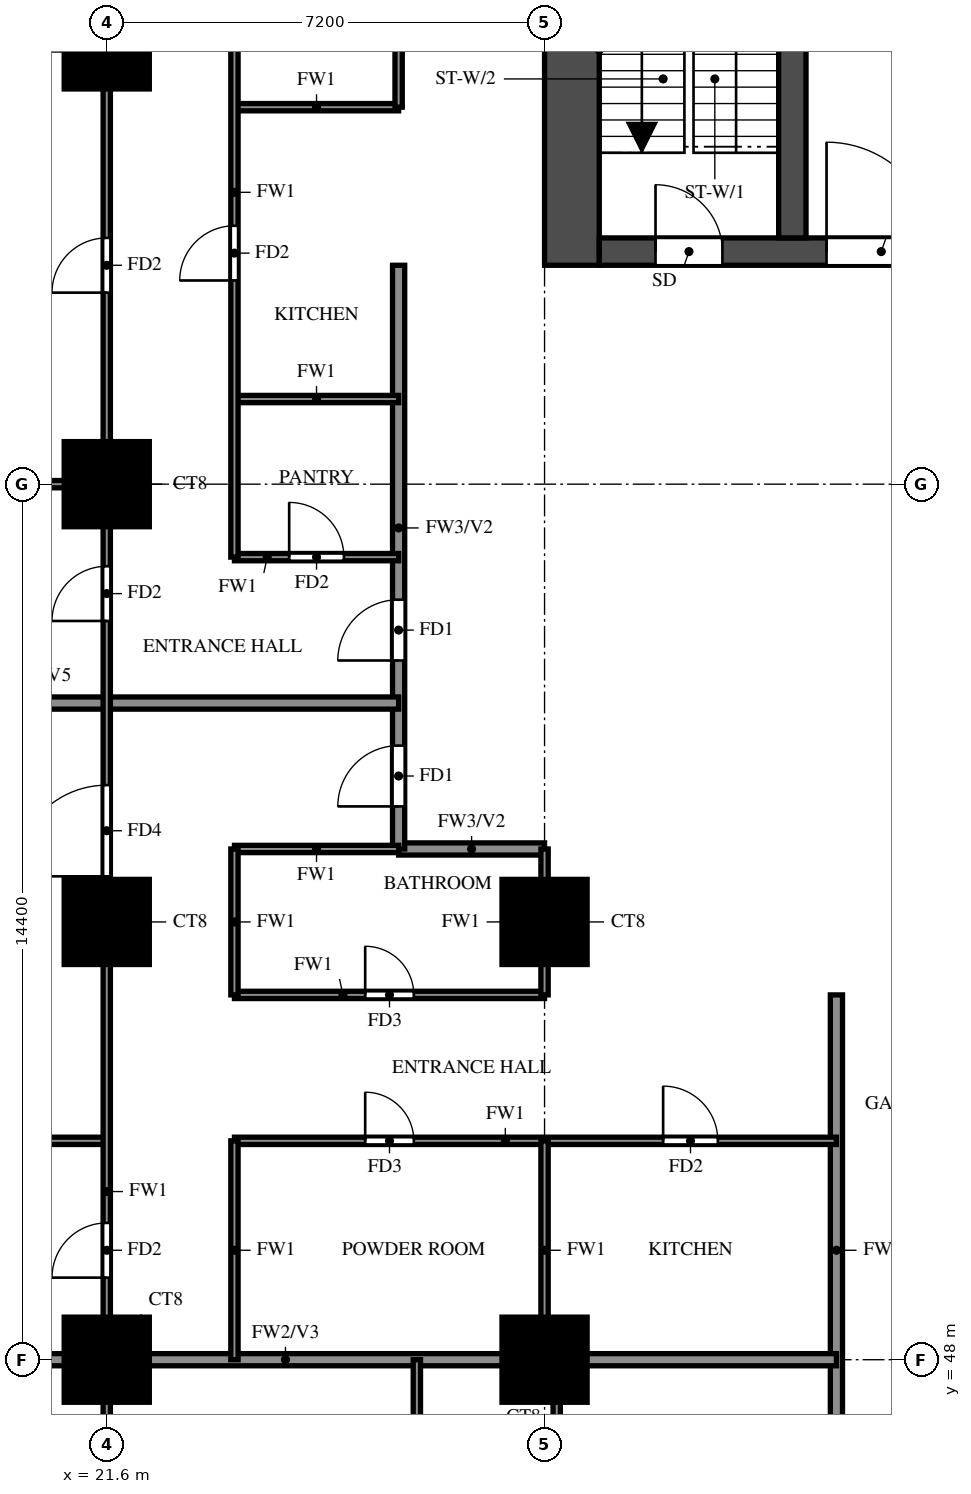
"""IFC4 building model, lengths in metres.
Left out: names, types, materials, properties, quantities, classifications, styles, units other than length and angle.
Written with IfcOpenShell. Run it as: python <this file> out.ifc"""

import sys

from ifc_helpers import new_model, si_unit, direction, frame, frame_2d, origin, origin_2d, place, context, subcontext, project, spatial, rectangle, extrude, source, transform, mapped, element, fill, save


model = new_model("IFC4")
c1 = context("Model", 3, precision=1e-05, world=origin(), true_north=direction((0.0, 1.0)))
c2 = subcontext(c1, "Body", "Model", "MODEL_VIEW")
j1 = project(units=[si_unit("LENGTHUNIT", "METRE"), si_unit("PLANEANGLEUNIT", "RADIAN")], contexts=[c1])
p1 = place(None, origin())
s1 = spatial("IfcSite", under=j1, at=p1, CompositionType="ELEMENT")
p2 = place(p1, origin())
s2 = spatial("IfcBuilding", under=s1, at=p2, CompositionType="ELEMENT")
p3 = place(p2, frame((0.0, 0.0, 44.5)))
s3 = spatial("IfcBuildingStorey", under=s2, at=p3, CompositionType="ELEMENT", Elevation=44.5)
m1 = source(origin(), c2, "Body", "SweptSolid", [
    extrude(rectangle(XDim=1.4, YDim=1.4, at=origin_2d()), origin(), (0.0, 0.0, 1.0), 3.18),
])
for number, where, z_axis, x_axis in (
    (1, (21.6, 48.0, 0.0), (0.0, 0.0, 1.0), (1.0, 0.0, 0.0)),
    (2, (28.8, 48.0, 0.0), (0.0, 0.0, 1.0), (1.0, 0.0, 0.0)),
    (3, (21.6, 55.2, 0.0), (0.0, 0.0, 1.0), (1.0, 0.0, 0.0)),
    (4, (28.8, 55.2, 0.0), (0.0, 0.0, 1.0), (1.0, 0.0, 0.0)),
    (5, (21.6, 62.4, 0.0), (0.0, 0.0, 1.0), (1.0, 0.0, 0.0)),
    (6, (21.6, 69.6, 0.0), (0.0, 0.0, 1.0), (1.0, 0.0, 0.0)),
):
    element("IfcColumn", number, at=place(p3, frame(where, z_axis=z_axis, x_axis=x_axis)), inside=s3, PredefinedType="COLUMN", context=c2, shape_type="MappedRepresentation", body=[
        mapped(m1, transform((0.0, 0.0, 0.0))),
    ])
p4 = place(p3, frame((29.25, 66.0, 0.0), z_axis=(0.0, 0.0, 1.0), x_axis=(0.0, 1.0, 0.0)))
e7 = element("IfcWall", 7, at=p4, inside=s3, PredefinedType="SHEAR", context=c2, shape_type="SweptSolid", body=[
    extrude(rectangle(XDim=12.0, YDim=0.9, at=frame_2d((6.0, 0.0))), origin(), (0.0, 0.0, 1.0), 3.18),
])
p5 = place(p3, frame((29.7, 66.225, 0.0), z_axis=(0.0, 0.0, 1.0), x_axis=(1.0, 0.0, 0.0)))
e8 = element("IfcWall", 8, at=p5, inside=s3, PredefinedType="SHEAR", context=c2, shape_type="SweptSolid", body=[
    extrude(rectangle(XDim=41.4, YDim=0.45, at=frame_2d((20.7, 0.0))), origin(), (0.0, 0.0, 1.0), 3.18),
])
p6 = place(p5, frame((0.925, 0.0, 0.0)))
e9 = element("IfcOpeningElement", 9, at=p6, cuts=e8, PredefinedType="OPENING", context=c2, shape_type="SweptSolid", body=[
    extrude(rectangle(XDim=1.1, YDim=2.1, at=frame_2d((0.55, 1.05))), frame((0.0, 0.235, 0.0), z_axis=(0.0, -1.0, 0.0), x_axis=(1.0, 0.0, 0.0)), (0.0, 0.0, 1.0), 0.47),
])
p7 = place(p5, frame((3.738, 0.0, 0.0)))
e10 = element("IfcOpeningElement", 10, at=p7, cuts=e8, PredefinedType="OPENING", context=c2, shape_type="SweptSolid", body=[
    extrude(rectangle(XDim=1.8, YDim=2.1, at=frame_2d((0.9, 1.05))), frame((0.0, 0.235, 0.0), z_axis=(0.0, -1.0, 0.0), x_axis=(1.0, 0.0, 0.0)), (0.0, 0.0, 1.0), 0.47),
])
p8 = place(p3, frame((32.875, 66.45, 0.0), z_axis=(0.0, 0.0, 1.0), x_axis=(0.0, 1.0, 0.0)))
e11 = element("IfcWall", 11, at=p8, inside=s3, PredefinedType="SHEAR", context=c2, shape_type="SweptSolid", body=[
    extrude(rectangle(XDim=10.65, YDim=0.45, at=frame_2d((5.325, 0.0))), origin(), (0.0, 0.0, 1.0), 3.18),
])
p9 = place(p3, frame((26.4, 56.4, 0.0), z_axis=(0.0, 0.0, 1.0), x_axis=(1.0, 0.0, 0.0)))
e12 = element("IfcWall", 12, at=p9, inside=s3, PredefinedType="SOLIDWALL", context=c2, shape_type="SweptSolid", body=[
    extrude(rectangle(XDim=2.4, YDim=0.2, at=frame_2d((1.2, 0.0))), origin(), (0.0, 0.0, 1.0), 3.18),
])
p10 = place(p3, frame((26.4, 56.4, 0.0), z_axis=(0.0, 0.0, 1.0), x_axis=(0.0, 1.0, 0.0)))
e13 = element("IfcWall", 13, at=p10, inside=s3, PredefinedType="SOLIDWALL", context=c2, shape_type="SweptSolid", body=[
    extrude(rectangle(XDim=9.6, YDim=0.2, at=frame_2d((4.8, 0.0))), origin(), (0.0, 0.0, 1.0), 3.18),
])
p11 = place(p10, frame((0.7, 0.0, 0.0)))
e14 = element("IfcOpeningElement", 14, at=p11, cuts=e13, PredefinedType="OPENING", context=c2, shape_type="SweptSolid", body=[
    extrude(rectangle(XDim=1.0, YDim=2.1, at=frame_2d((0.5, 1.05))), frame((0.0, 0.11, 0.0), z_axis=(0.0, -1.0, 0.0), x_axis=(1.0, 0.0, 0.0)), (0.0, 0.0, 1.0), 0.22),
])
p12 = place(p10, frame((3.1, 0.0, 0.0)))
e15 = element("IfcOpeningElement", 15, at=p12, cuts=e13, PredefinedType="OPENING", context=c2, shape_type="SweptSolid", body=[
    extrude(rectangle(XDim=1.0, YDim=2.1, at=frame_2d((0.5, 1.05))), frame((0.0, 0.11, 0.0), z_axis=(0.0, -1.0, 0.0), x_axis=(1.0, 0.0, 0.0)), (0.0, 0.0, 1.0), 0.22),
])
p13 = place(p3, frame((33.6, 45.6, 0.0), z_axis=(0.0, 0.0, 1.0), x_axis=(0.0, 1.0, 0.0)))
e16 = element("IfcWall", 16, at=p13, inside=s3, PredefinedType="SOLIDWALL", context=c2, shape_type="SweptSolid", body=[
    extrude(rectangle(XDim=8.4, YDim=0.2, at=frame_2d((4.2, 0.0))), origin(), (0.0, 0.0, 1.0), 3.18),
])
p14 = place(p3, frame((14.525, 48.0, 0.0), z_axis=(0.0, 0.0, 1.0), x_axis=(1.0, 0.0, 0.0)))
e17 = element("IfcWall", 17, at=p14, inside=s3, PredefinedType="SOLIDWALL", context=c2, shape_type="SweptSolid", body=[
    extrude(rectangle(XDim=19.075, YDim=0.2, at=frame_2d((9.538, 0.0))), origin(), (0.0, 0.0, 1.0), 3.18),
])
p15 = place(p3, frame((14.525, 58.8, 0.0), z_axis=(0.0, 0.0, 1.0), x_axis=(1.0, 0.0, 0.0)))
e18 = element("IfcWall", 18, at=p15, inside=s3, PredefinedType="SOLIDWALL", context=c2, shape_type="SweptSolid", body=[
    extrude(rectangle(XDim=11.875, YDim=0.2, at=frame_2d((5.938, 0.0))), origin(), (0.0, 0.0, 1.0), 2.28),
])
p16 = place(p3, frame((14.525, 51.6, 0.0), z_axis=(0.0, 0.0, 1.0), x_axis=(1.0, 0.0, 0.0)))
e19 = element("IfcWall", 19, at=p16, inside=s3, PredefinedType="PARTITIONING", context=c2, shape_type="SweptSolid", body=[
    extrude(rectangle(XDim=7.075, YDim=0.12, at=frame_2d((3.538, 0.0))), origin(), (0.0, 0.0, 1.0), 2.28),
])
p17 = place(p3, frame((23.7, 51.6, 0.0), z_axis=(0.0, 0.0, 1.0), x_axis=(1.0, 0.0, 0.0)))
e20 = element("IfcWall", 20, at=p17, inside=s3, PredefinedType="PARTITIONING", context=c2, shape_type="SweptSolid", body=[
    extrude(rectangle(XDim=9.9, YDim=0.12, at=frame_2d((4.95, 0.0))), origin(), (0.0, 0.0, 1.0), 3.18),
])
p18 = place(p17, frame((2.15, 0.0, 0.0)))
e21 = element("IfcOpeningElement", 21, at=p18, cuts=e20, PredefinedType="OPENING", context=c2, shape_type="SweptSolid", body=[
    extrude(rectangle(XDim=0.8, YDim=2.1, at=frame_2d((0.4, 1.05))), frame((0.0, 0.07, 0.0), z_axis=(0.0, -1.0, 0.0), x_axis=(1.0, 0.0, 0.0)), (0.0, 0.0, 1.0), 0.14),
])
p19 = place(p17, frame((7.05, 0.0, 0.0)))
e22 = element("IfcOpeningElement", 22, at=p19, cuts=e20, PredefinedType="OPENING", context=c2, shape_type="SweptSolid", body=[
    extrude(rectangle(XDim=0.9, YDim=2.1, at=frame_2d((0.45, 1.05))), frame((0.0, 0.07, 0.0), z_axis=(0.0, -1.0, 0.0), x_axis=(1.0, 0.0, 0.0)), (0.0, 0.0, 1.0), 0.14),
])
p20 = place(p3, frame((23.7, 54.0, 0.0), z_axis=(0.0, 0.0, 1.0), x_axis=(1.0, 0.0, 0.0)))
e23 = element("IfcWall", 23, at=p20, inside=s3, PredefinedType="PARTITIONING", context=c2, shape_type="SweptSolid", body=[
    extrude(rectangle(XDim=5.1, YDim=0.12, at=frame_2d((2.55, 0.0))), origin(), (0.0, 0.0, 1.0), 3.18),
])
p21 = place(p20, frame((2.15, 0.0, 0.0)))
e24 = element("IfcOpeningElement", 24, at=p21, cuts=e23, PredefinedType="OPENING", context=c2, shape_type="SweptSolid", body=[
    extrude(rectangle(XDim=0.8, YDim=2.1, at=frame_2d((0.4, 1.05))), frame((0.0, 0.07, 0.0), z_axis=(0.0, -1.0, 0.0), x_axis=(1.0, 0.0, 0.0)), (0.0, 0.0, 1.0), 0.14),
])
p22 = place(p3, frame((23.7, 56.4, 0.0), z_axis=(0.0, 0.0, 1.0), x_axis=(1.0, 0.0, 0.0)))
e25 = element("IfcWall", 25, at=p22, inside=s3, PredefinedType="PARTITIONING", context=c2, shape_type="SweptSolid", body=[
    extrude(rectangle(XDim=2.7, YDim=0.12, at=frame_2d((1.35, 0.0))), origin(), (0.0, 0.0, 1.0), 3.18),
])
p23 = place(p3, frame((23.7, 61.2, 0.0), z_axis=(0.0, 0.0, 1.0), x_axis=(1.0, 0.0, 0.0)))
e26 = element("IfcWall", 26, at=p23, inside=s3, PredefinedType="PARTITIONING", context=c2, shape_type="SweptSolid", body=[
    extrude(rectangle(XDim=2.7, YDim=0.12, at=frame_2d((1.35, 0.0))), origin(), (0.0, 0.0, 1.0), 3.18),
])
p24 = place(p23, frame((0.9, 0.0, 0.0)))
e27 = element("IfcOpeningElement", 27, at=p24, cuts=e26, PredefinedType="OPENING", context=c2, shape_type="SweptSolid", body=[
    extrude(rectangle(XDim=0.9, YDim=2.1, at=frame_2d((0.45, 1.05))), frame((0.0, 0.07, 0.0), z_axis=(0.0, -1.0, 0.0), x_axis=(1.0, 0.0, 0.0)), (0.0, 0.0, 1.0), 0.14),
])
p25 = place(p3, frame((14.525, 62.4, 0.0), z_axis=(0.0, 0.0, 1.0), x_axis=(1.0, 0.0, 0.0)))
e28 = element("IfcWall", 28, at=p25, inside=s3, PredefinedType="PARTITIONING", context=c2, shape_type="SweptSolid", body=[
    extrude(rectangle(XDim=7.075, YDim=0.12, at=frame_2d((3.538, 0.0))), origin(), (0.0, 0.0, 1.0), 3.18),
])
for number, where, z_axis, x_axis in (
    (29, (23.7, 63.8, 0.0), (0.0, 0.0, 1.0), (1.0, 0.0, 0.0)),
    (30, (23.7, 68.6, 0.0), (0.0, 0.0, 1.0), (1.0, 0.0, 0.0)),
):
    element("IfcWall", number, at=place(p3, frame(where, z_axis=z_axis, x_axis=x_axis)), inside=s3, PredefinedType="PARTITIONING", context=c2, shape_type="SweptSolid", body=[
        extrude(rectangle(XDim=2.7, YDim=0.12, at=frame_2d((1.35, 0.0))), origin(), (0.0, 0.0, 1.0), 3.18),
    ])
p26 = place(p3, frame((21.6, 33.725, 0.0), z_axis=(0.0, 0.0, 1.0), x_axis=(0.0, 1.0, 0.0)))
e31 = element("IfcWall", 31, at=p26, inside=s3, PredefinedType="PARTITIONING", context=c2, shape_type="SweptSolid", body=[
    extrude(rectangle(XDim=35.875, YDim=0.12, at=frame_2d((17.938, 0.0))), origin(), (0.0, 0.0, 1.0), 3.18),
])
p27 = place(p26, frame((7.775, 0.0, 0.0)))
e32 = element("IfcOpeningElement", 32, at=p27, cuts=e31, PredefinedType="OPENING", context=c2, shape_type="SweptSolid", body=[
    extrude(rectangle(XDim=0.9, YDim=2.1, at=frame_2d((0.45, 1.05))), frame((0.0, 0.07, 0.0), z_axis=(0.0, -1.0, 0.0), x_axis=(1.0, 0.0, 0.0)), (0.0, 0.0, 1.0), 0.14),
])
p28 = place(p26, frame((15.625, 0.0, 0.0)))
e33 = element("IfcOpeningElement", 33, at=p28, cuts=e31, PredefinedType="OPENING", context=c2, shape_type="SweptSolid", body=[
    extrude(rectangle(XDim=0.9, YDim=2.1, at=frame_2d((0.45, 1.05))), frame((0.0, 0.07, 0.0), z_axis=(0.0, -1.0, 0.0), x_axis=(1.0, 0.0, 0.0)), (0.0, 0.0, 1.0), 0.14),
])
p29 = place(p26, frame((22.225, 0.0, 0.0)))
e34 = element("IfcOpeningElement", 34, at=p29, cuts=e31, PredefinedType="OPENING", context=c2, shape_type="SweptSolid", body=[
    extrude(rectangle(XDim=1.5, YDim=2.1, at=frame_2d((0.75, 1.05))), frame((0.0, 0.07, 0.0), z_axis=(0.0, -1.0, 0.0), x_axis=(1.0, 0.0, 0.0)), (0.0, 0.0, 1.0), 0.14),
])
p30 = place(p26, frame((26.425, 0.0, 0.0)))
e35 = element("IfcOpeningElement", 35, at=p30, cuts=e31, PredefinedType="OPENING", context=c2, shape_type="SweptSolid", body=[
    extrude(rectangle(XDim=0.9, YDim=2.1, at=frame_2d((0.45, 1.05))), frame((0.0, 0.07, 0.0), z_axis=(0.0, -1.0, 0.0), x_axis=(1.0, 0.0, 0.0)), (0.0, 0.0, 1.0), 0.14),
])
p31 = place(p26, frame((31.825, 0.0, 0.0)))
e36 = element("IfcOpeningElement", 36, at=p31, cuts=e31, PredefinedType="OPENING", context=c2, shape_type="SweptSolid", body=[
    extrude(rectangle(XDim=0.9, YDim=2.1, at=frame_2d((0.45, 1.05))), frame((0.0, 0.07, 0.0), z_axis=(0.0, -1.0, 0.0), x_axis=(1.0, 0.0, 0.0)), (0.0, 0.0, 1.0), 0.14),
])
p32 = place(p3, frame((23.7, 48.0, 0.0), z_axis=(0.0, 0.0, 1.0), x_axis=(0.0, 1.0, 0.0)))
e37 = element("IfcWall", 37, at=p32, inside=s3, PredefinedType="PARTITIONING", context=c2, shape_type="SweptSolid", body=[
    extrude(rectangle(XDim=3.6, YDim=0.12, at=frame_2d((1.8, 0.0))), origin(), (0.0, 0.0, 1.0), 3.18),
])
p33 = place(p3, frame((23.7, 54.0, 0.0), z_axis=(0.0, 0.0, 1.0), x_axis=(0.0, 1.0, 0.0)))
e38 = element("IfcWall", 38, at=p33, inside=s3, PredefinedType="PARTITIONING", context=c2, shape_type="SweptSolid", body=[
    extrude(rectangle(XDim=2.4, YDim=0.12, at=frame_2d((1.2, 0.0))), origin(), (0.0, 0.0, 1.0), 3.18),
])
p34 = place(p3, frame((23.7, 61.2, 0.0), z_axis=(0.0, 0.0, 1.0), x_axis=(0.0, 1.0, 0.0)))
e39 = element("IfcWall", 39, at=p34, inside=s3, PredefinedType="PARTITIONING", context=c2, shape_type="SweptSolid", body=[
    extrude(rectangle(XDim=12.0, YDim=0.12, at=frame_2d((6.0, 0.0))), origin(), (0.0, 0.0, 1.0), 3.18),
])
p35 = place(p34, frame((4.55, 0.0, 0.0)))
e40 = element("IfcOpeningElement", 40, at=p35, cuts=e39, PredefinedType="OPENING", context=c2, shape_type="SweptSolid", body=[
    extrude(rectangle(XDim=0.9, YDim=2.1, at=frame_2d((0.45, 1.05))), frame((0.0, 0.07, 0.0), z_axis=(0.0, -1.0, 0.0), x_axis=(1.0, 0.0, 0.0)), (0.0, 0.0, 1.0), 0.14),
])
p36 = place(p34, frame((9.3, 0.0, 0.0)))
e41 = element("IfcOpeningElement", 41, at=p36, cuts=e39, PredefinedType="OPENING", context=c2, shape_type="SweptSolid", body=[
    extrude(rectangle(XDim=0.8, YDim=2.1, at=frame_2d((0.4, 1.05))), frame((0.0, 0.07, 0.0), z_axis=(0.0, -1.0, 0.0), x_axis=(1.0, 0.0, 0.0)), (0.0, 0.0, 1.0), 0.14),
])
p37 = place(p3, frame((26.4, 68.6, 0.0), z_axis=(0.0, 0.0, 1.0), x_axis=(0.0, 1.0, 0.0)))
e42 = element("IfcWall", 42, at=p37, inside=s3, PredefinedType="PARTITIONING", context=c2, shape_type="SweptSolid", body=[
    extrude(rectangle(XDim=4.6, YDim=0.12, at=frame_2d((2.3, 0.0))), origin(), (0.0, 0.0, 1.0), 3.18),
])
p38 = place(p3, frame((26.7, 42.9, 0.0), z_axis=(0.0, 0.0, 1.0), x_axis=(0.0, 1.0, 0.0)))
e43 = element("IfcWall", 43, at=p38, inside=s3, PredefinedType="PARTITIONING", context=c2, shape_type="SweptSolid", body=[
    extrude(rectangle(XDim=5.1, YDim=0.12, at=frame_2d((2.55, 0.0))), origin(), (0.0, 0.0, 1.0), 3.18),
])
p39 = place(p3, frame((28.8, 48.0, 0.0), z_axis=(0.0, 0.0, 1.0), x_axis=(0.0, 1.0, 0.0)))
e44 = element("IfcWall", 44, at=p39, inside=s3, PredefinedType="PARTITIONING", context=c2, shape_type="SweptSolid", body=[
    extrude(rectangle(XDim=3.6, YDim=0.12, at=frame_2d((1.8, 0.0))), origin(), (0.0, 0.0, 1.0), 3.18),
])
p40 = place(p3, frame((28.8, 54.0, 0.0), z_axis=(0.0, 0.0, 1.0), x_axis=(0.0, 1.0, 0.0)))
e45 = element("IfcWall", 45, at=p40, inside=s3, PredefinedType="PARTITIONING", context=c2, shape_type="SweptSolid", body=[
    extrude(rectangle(XDim=2.4, YDim=0.12, at=frame_2d((1.2, 0.0))), origin(), (0.0, 0.0, 1.0), 3.18),
])
p41 = place(p3, frame((29.0, 42.9, 0.0), z_axis=(0.0, 0.0, 1.0), x_axis=(0.0, 1.0, 0.0)))
e46 = element("IfcWall", 46, at=p41, inside=s3, PredefinedType="PARTITIONING", context=c2, shape_type="SweptSolid", body=[
    extrude(rectangle(XDim=5.1, YDim=0.12, at=frame_2d((2.55, 0.0))), origin(), (0.0, 0.0, 1.0), 3.18),
])
p42 = place(p6, origin())
e47 = element("IfcDoor", 47, at=p42, inside=s3, OperationType="SINGLE_SWING_LEFT", PredefinedType="DOOR", context=c2, shape_type="SweptSolid", body=[
    extrude(rectangle(XDim=1.1, YDim=2.1, at=frame_2d((0.55, 1.05))), frame((0.0, 0.025, 0.0), z_axis=(0.0, -1.0, 0.0), x_axis=(1.0, 0.0, 0.0)), (0.0, 0.0, 1.0), 0.05),
])
fill(e9, e47)
p43 = place(p7, origin())
e48 = element("IfcDoor", 48, at=p43, inside=s3, OperationType="DOUBLE_DOOR_SINGLE_SWING", PredefinedType="DOOR", context=c2, shape_type="SweptSolid", body=[
    extrude(rectangle(XDim=1.8, YDim=2.1, at=frame_2d((0.9, 1.05))), frame((0.0, 0.025, 0.0), z_axis=(0.0, -1.0, 0.0), x_axis=(1.0, 0.0, 0.0)), (0.0, 0.0, 1.0), 0.05),
])
fill(e10, e48)
p44 = place(p11, origin())
e49 = element("IfcDoor", 49, at=p44, inside=s3, OperationType="SINGLE_SWING_LEFT", PredefinedType="DOOR", context=c2, shape_type="SweptSolid", body=[
    extrude(rectangle(XDim=1.0, YDim=2.1, at=frame_2d((0.5, 1.05))), frame((0.0, 0.025, 0.0), z_axis=(0.0, -1.0, 0.0), x_axis=(1.0, 0.0, 0.0)), (0.0, 0.0, 1.0), 0.05),
])
fill(e14, e49)
p45 = place(p28, origin())
e50 = element("IfcDoor", 50, at=p45, inside=s3, OperationType="SINGLE_SWING_LEFT", PredefinedType="DOOR", context=c2, shape_type="SweptSolid", body=[
    extrude(rectangle(XDim=0.9, YDim=2.1, at=frame_2d((0.45, 1.05))), frame((0.0, 0.025, 0.0), z_axis=(0.0, -1.0, 0.0), x_axis=(1.0, 0.0, 0.0)), (0.0, 0.0, 1.0), 0.05),
])
fill(e33, e50)
p46 = place(p29, origin())
e51 = element("IfcDoor", 51, at=p46, inside=s3, OperationType="SINGLE_SWING_LEFT", PredefinedType="DOOR", context=c2, shape_type="SweptSolid", body=[
    extrude(rectangle(XDim=1.5, YDim=2.1, at=frame_2d((0.75, 1.05))), frame((0.0, 0.025, 0.0), z_axis=(0.0, -1.0, 0.0), x_axis=(1.0, 0.0, 0.0)), (0.0, 0.0, 1.0), 0.05),
])
fill(e34, e51)
p47 = place(p18, origin())
e52 = element("IfcDoor", 52, at=p47, inside=s3, OperationType="SINGLE_SWING_LEFT", PredefinedType="DOOR", context=c2, shape_type="SweptSolid", body=[
    extrude(rectangle(XDim=0.8, YDim=2.1, at=frame_2d((0.4, 1.05))), frame((0.0, 0.025, 0.0), z_axis=(0.0, -1.0, 0.0), x_axis=(1.0, 0.0, 0.0)), (0.0, 0.0, 1.0), 0.05),
])
fill(e21, e52)
p48 = place(p21, origin())
e53 = element("IfcDoor", 53, at=p48, inside=s3, OperationType="SINGLE_SWING_LEFT", PredefinedType="DOOR", context=c2, shape_type="SweptSolid", body=[
    extrude(rectangle(XDim=0.8, YDim=2.1, at=frame_2d((0.4, 1.05))), frame((0.0, 0.025, 0.0), z_axis=(0.0, -1.0, 0.0), x_axis=(1.0, 0.0, 0.0)), (0.0, 0.0, 1.0), 0.05),
])
fill(e24, e53)
p49 = place(p19, origin())
e54 = element("IfcDoor", 54, at=p49, inside=s3, OperationType="SINGLE_SWING_RIGHT", PredefinedType="DOOR", context=c2, shape_type="SweptSolid", body=[
    extrude(rectangle(XDim=0.9, YDim=2.1, at=frame_2d((0.45, 1.05))), frame((0.0, 0.025, 0.0), z_axis=(0.0, -1.0, 0.0), x_axis=(1.0, 0.0, 0.0)), (0.0, 0.0, 1.0), 0.05),
])
fill(e22, e54)
p50 = place(p12, origin())
e55 = element("IfcDoor", 55, at=p50, inside=s3, OperationType="SINGLE_SWING_RIGHT", PredefinedType="DOOR", context=c2, shape_type="SweptSolid", body=[
    extrude(rectangle(XDim=1.0, YDim=2.1, at=frame_2d((0.5, 1.05))), frame((0.0, 0.025, 0.0), z_axis=(0.0, -1.0, 0.0), x_axis=(1.0, 0.0, 0.0)), (0.0, 0.0, 1.0), 0.05),
])
fill(e15, e55)
p51 = place(p30, origin())
e56 = element("IfcDoor", 56, at=p51, inside=s3, OperationType="SINGLE_SWING_LEFT", PredefinedType="DOOR", context=c2, shape_type="SweptSolid", body=[
    extrude(rectangle(XDim=0.9, YDim=2.1, at=frame_2d((0.45, 1.05))), frame((0.0, 0.025, 0.0), z_axis=(0.0, -1.0, 0.0), x_axis=(1.0, 0.0, 0.0)), (0.0, 0.0, 1.0), 0.05),
])
fill(e35, e56)
p52 = place(p31, origin())
e57 = element("IfcDoor", 57, at=p52, inside=s3, OperationType="SINGLE_SWING_LEFT", PredefinedType="DOOR", context=c2, shape_type="SweptSolid", body=[
    extrude(rectangle(XDim=0.9, YDim=2.1, at=frame_2d((0.45, 1.05))), frame((0.0, 0.025, 0.0), z_axis=(0.0, -1.0, 0.0), x_axis=(1.0, 0.0, 0.0)), (0.0, 0.0, 1.0), 0.05),
])
fill(e36, e57)
p53 = place(p24, origin())
e58 = element("IfcDoor", 58, at=p53, inside=s3, OperationType="SINGLE_SWING_LEFT", PredefinedType="DOOR", context=c2, shape_type="SweptSolid", body=[
    extrude(rectangle(XDim=0.9, YDim=2.1, at=frame_2d((0.45, 1.05))), frame((0.0, 0.025, 0.0), z_axis=(0.0, -1.0, 0.0), x_axis=(1.0, 0.0, 0.0)), (0.0, 0.0, 1.0), 0.05),
])
fill(e27, e58)
p54 = place(p35, origin())
e59 = element("IfcDoor", 59, at=p54, inside=s3, OperationType="SINGLE_SWING_RIGHT", PredefinedType="DOOR", context=c2, shape_type="SweptSolid", body=[
    extrude(rectangle(XDim=0.9, YDim=2.1, at=frame_2d((0.45, 1.05))), frame((0.0, 0.025, 0.0), z_axis=(0.0, -1.0, 0.0), x_axis=(1.0, 0.0, 0.0)), (0.0, 0.0, 1.0), 0.05),
])
fill(e40, e59)
save(model, sys.argv[1])
